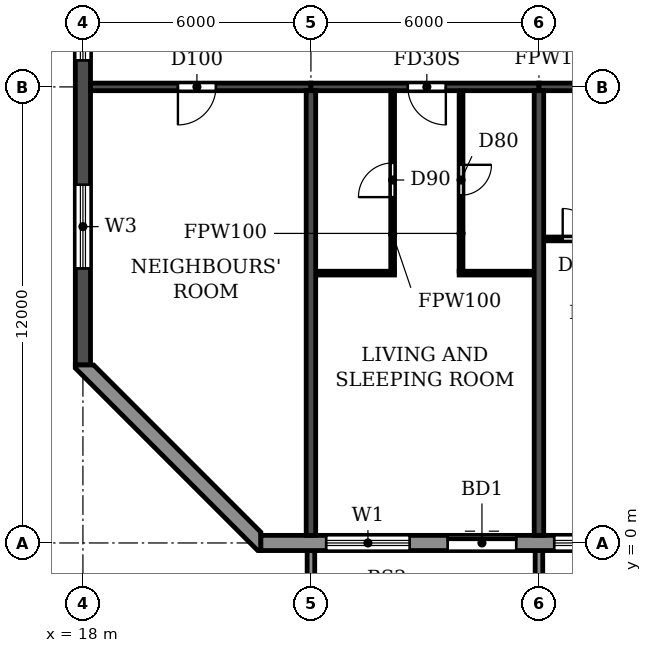
"""IFC4 building model, lengths in metres.
Left out: names, types, materials, properties, quantities, classifications, styles, units other than length and angle.
Written with IfcOpenShell. Run it as: python <this file> out.ifc"""

import sys

from ifc_helpers import new_model, si_unit, direction, frame, frame_2d, origin, place, context, subcontext, project, spatial, polyline, rectangle, outline, extrude, source, transform, mapped, element, fill, save


model = new_model("IFC4")
c1 = context("Model", 3, precision=1e-05, world=origin(), true_north=direction((0.0, 1.0)))
c2 = subcontext(c1, "Body", "Model", "MODEL_VIEW")
j1 = project(units=[si_unit("LENGTHUNIT", "METRE"), si_unit("PLANEANGLEUNIT", "RADIAN")], contexts=[c1])
p1 = place(None, origin())
s1 = spatial("IfcSite", under=j1, at=p1, CompositionType="ELEMENT")
p2 = place(p1, origin())
s2 = spatial("IfcBuilding", under=s1, at=p2, CompositionType="ELEMENT")
p3 = place(p2, frame((0.0, 0.0, 171.9)))
s3 = spatial("IfcBuildingStorey", under=s2, at=p3, CompositionType="ELEMENT", Elevation=171.9)
for number, where, z_axis, x_axis in (
    (1, (24.0, 0.2, 0.0), (0.0, 0.0, 1.0), (0.0, 1.0, 0.0)),
    (2, (30.0, 0.2, 0.0), (0.0, 0.0, 1.0), (0.0, 1.0, 0.0)),
):
    element("IfcWall", number, at=place(p3, frame(where, z_axis=z_axis, x_axis=x_axis)), inside=s3, PredefinedType="SHEAR", context=c2, shape_type="SweptSolid", body=[
        extrude(rectangle(XDim=11.7, YDim=0.25, at=frame_2d((5.85, 0.0))), origin(), (0.0, 0.0, 1.0), 3.08),
    ])
p4 = place(p3, frame((18.0, 4.683, 0.0), z_axis=(0.0, 0.0, 1.0), x_axis=(0.0, 1.0, 0.0)))
e3 = element("IfcWall", 3, at=p4, inside=s3, PredefinedType="SHEAR", context=c2, shape_type="SweptSolid", body=[
    extrude(rectangle(XDim=31.834, YDim=0.4, at=frame_2d((15.917, 0.0))), origin(), (0.0, 0.0, 1.0), 3.08),
])
p5 = place(p4, frame((23.817, 0.0, 0.9)))
e4 = element("IfcOpeningElement", 4, at=p5, cuts=e3, PredefinedType="OPENING", context=c2, shape_type="SweptSolid", body=[
    extrude(rectangle(XDim=1.2, YDim=1.5, at=frame_2d((0.6, 0.75))), frame((0.0, 0.21, 0.0), z_axis=(0.0, -1.0, 0.0), x_axis=(1.0, 0.0, 0.0)), (0.0, 0.0, 1.0), 0.42),
])
p6 = place(p4, frame((8.017, 0.0, 0.9)))
e5 = element("IfcOpeningElement", 5, at=p6, cuts=e3, PredefinedType="OPENING", context=c2, shape_type="SweptSolid", body=[
    extrude(rectangle(XDim=1.2, YDim=1.5, at=frame_2d((0.6, 0.75))), frame((0.0, 0.21, 0.0), z_axis=(0.0, -1.0, 0.0), x_axis=(1.0, 0.0, 0.0)), (0.0, 0.0, 1.0), 0.42),
])
p7 = place(p4, frame((27.694, 0.0, 0.6)))
e6 = element("IfcOpeningElement", 6, at=p7, cuts=e3, PredefinedType="OPENING", context=c2, shape_type="SweptSolid", body=[
    extrude(rectangle(XDim=2.2, YDim=1.8, at=frame_2d((1.1, 0.9))), frame((0.0, 0.21, 0.0), z_axis=(0.0, -1.0, 0.0), x_axis=(1.0, 0.0, 0.0)), (0.0, 0.0, 1.0), 0.42),
])
p8 = place(p4, frame((2.541, 0.0, 0.6)))
e7 = element("IfcOpeningElement", 7, at=p8, cuts=e3, PredefinedType="OPENING", context=c2, shape_type="SweptSolid", body=[
    extrude(rectangle(XDim=2.2, YDim=1.8, at=frame_2d((1.1, 0.9))), frame((0.0, 0.21, 0.0), z_axis=(0.0, -1.0, 0.0), x_axis=(1.0, 0.0, 0.0)), (0.0, 0.0, 1.0), 0.42),
])
p9 = place(p4, frame((15.917, 0.0, 0.9)))
e8 = element("IfcOpeningElement", 8, at=p9, cuts=e3, PredefinedType="OPENING", context=c2, shape_type="SweptSolid", body=[
    extrude(rectangle(XDim=1.2, YDim=1.5, at=frame_2d((0.6, 0.75))), frame((0.0, 0.21, 0.0), z_axis=(0.0, -1.0, 0.0), x_axis=(1.0, 0.0, 0.0)), (0.0, 0.0, 1.0), 0.42),
])
p10 = place(p3, frame((18.2, 12.0, 0.0), z_axis=(0.0, 0.0, 1.0), x_axis=(1.0, 0.0, 0.0)))
e9 = element("IfcWall", 9, at=p10, inside=s3, PredefinedType="SHEAR", context=c2, shape_type="SweptSolid", body=[
    extrude(rectangle(XDim=5.8, YDim=0.2, at=frame_2d((2.9, 0.0))), origin(), (0.0, 0.0, 1.0), 2.48),
])
p11 = place(p10, frame((2.3, 0.0, 0.0)))
e10 = element("IfcOpeningElement", 10, at=p11, cuts=e9, PredefinedType="OPENING", context=c2, shape_type="SweptSolid", body=[
    extrude(rectangle(XDim=1.0, YDim=2.1, at=frame_2d((0.5, 1.05))), frame((0.0, 0.11, 0.0), z_axis=(0.0, -1.0, 0.0), x_axis=(1.0, 0.0, 0.0)), (0.0, 0.0, 1.0), 0.22),
])
p12 = place(p3, frame((24.0, 12.0, 0.0), z_axis=(0.0, 0.0, 1.0), x_axis=(1.0, 0.0, 0.0)))
e11 = element("IfcWall", 11, at=p12, inside=s3, PredefinedType="SHEAR", context=c2, shape_type="SweptSolid", body=[
    extrude(rectangle(XDim=6.0, YDim=0.2, at=frame_2d((3.0, 0.0))), origin(), (0.0, 0.0, 1.0), 2.48),
])
p13 = place(p12, frame((2.55, 0.0, 0.0)))
e12 = element("IfcOpeningElement", 12, at=p13, cuts=e11, PredefinedType="OPENING", context=c2, shape_type="SweptSolid", body=[
    extrude(rectangle(XDim=1.0, YDim=2.1, at=frame_2d((0.5, 1.05))), frame((0.0, 0.11, 0.0), z_axis=(0.0, -1.0, 0.0), x_axis=(1.0, 0.0, 0.0)), (0.0, 0.0, 1.0), 0.22),
])
p14 = place(p3, frame((30.0, 12.0, 0.0), z_axis=(0.0, 0.0, 1.0), x_axis=(1.0, 0.0, 0.0)))
e13 = element("IfcWall", 13, at=p14, inside=s3, PredefinedType="SHEAR", context=c2, shape_type="SweptSolid", body=[
    extrude(rectangle(XDim=6.0, YDim=0.2, at=frame_2d((3.0, 0.0))), origin(), (0.0, 0.0, 1.0), 2.48),
])
p15 = place(p14, frame((2.45, 0.0, 0.0)))
e14 = element("IfcOpeningElement", 14, at=p15, cuts=e13, PredefinedType="OPENING", context=c2, shape_type="SweptSolid", body=[
    extrude(rectangle(XDim=1.0, YDim=2.1, at=frame_2d((0.5, 1.05))), frame((0.0, 0.11, 0.0), z_axis=(0.0, -1.0, 0.0), x_axis=(1.0, 0.0, 0.0)), (0.0, 0.0, 1.0), 0.22),
])
p16 = place(p3, frame((22.683, 0.0, 0.0), z_axis=(0.0, 0.0, 1.0), x_axis=(1.0, 0.0, 0.0)))
e15 = element("IfcWall", 15, at=p16, inside=s3, PredefinedType="STANDARD", context=c2, shape_type="SweptSolid", body=[
    extrude(rectangle(XDim=56.634, YDim=0.4, at=frame_2d((28.317, 0.0))), origin(), (0.0, 0.0, 1.0), 3.08),
])
p17 = place(p16, frame((1.717, 0.0, 0.9)))
e16 = element("IfcOpeningElement", 16, at=p17, cuts=e15, PredefinedType="OPENING", context=c2, shape_type="SweptSolid", body=[
    extrude(rectangle(XDim=2.2, YDim=1.5, at=frame_2d((1.1, 0.75))), frame((0.0, 0.21, 0.0), z_axis=(0.0, -1.0, 0.0), x_axis=(1.0, 0.0, 0.0)), (0.0, 0.0, 1.0), 0.42),
])
p18 = place(p16, frame((4.917, 0.0, 0.0)))
e17 = element("IfcOpeningElement", 17, at=p18, cuts=e15, PredefinedType="OPENING", context=c2, shape_type="SweptSolid", body=[
    extrude(rectangle(XDim=1.8, YDim=2.4, at=frame_2d((0.9, 1.2))), frame((0.0, 0.21, 0.0), z_axis=(0.0, -1.0, 0.0), x_axis=(1.0, 0.0, 0.0)), (0.0, 0.0, 1.0), 0.42),
])
p19 = place(p16, frame((7.717, 0.0, 0.9)))
e18 = element("IfcOpeningElement", 18, at=p19, cuts=e15, PredefinedType="OPENING", context=c2, shape_type="SweptSolid", body=[
    extrude(rectangle(XDim=2.2, YDim=1.5, at=frame_2d((1.1, 0.75))), frame((0.0, 0.21, 0.0), z_axis=(0.0, -1.0, 0.0), x_axis=(1.0, 0.0, 0.0)), (0.0, 0.0, 1.0), 0.42),
])
p20 = place(p16, frame((10.717, 0.0, 0.9)))
e19 = element("IfcOpeningElement", 19, at=p20, cuts=e15, PredefinedType="OPENING", context=c2, shape_type="SweptSolid", body=[
    extrude(rectangle(XDim=2.2, YDim=1.5, at=frame_2d((1.1, 0.75))), frame((0.0, 0.21, 0.0), z_axis=(0.0, -1.0, 0.0), x_axis=(1.0, 0.0, 0.0)), (0.0, 0.0, 1.0), 0.42),
])
p21 = place(p16, frame((13.717, 0.0, 0.9)))
e20 = element("IfcOpeningElement", 20, at=p21, cuts=e15, PredefinedType="OPENING", context=c2, shape_type="SweptSolid", body=[
    extrude(rectangle(XDim=2.2, YDim=1.5, at=frame_2d((1.1, 0.75))), frame((0.0, 0.21, 0.0), z_axis=(0.0, -1.0, 0.0), x_axis=(1.0, 0.0, 0.0)), (0.0, 0.0, 1.0), 0.42),
])
p22 = place(p16, frame((16.917, 0.0, 0.0)))
e21 = element("IfcOpeningElement", 21, at=p22, cuts=e15, PredefinedType="OPENING", context=c2, shape_type="SweptSolid", body=[
    extrude(rectangle(XDim=1.8, YDim=2.4, at=frame_2d((0.9, 1.2))), frame((0.0, 0.21, 0.0), z_axis=(0.0, -1.0, 0.0), x_axis=(1.0, 0.0, 0.0)), (0.0, 0.0, 1.0), 0.42),
])
p23 = place(p16, frame((19.717, 0.0, 0.9)))
e22 = element("IfcOpeningElement", 22, at=p23, cuts=e15, PredefinedType="OPENING", context=c2, shape_type="SweptSolid", body=[
    extrude(rectangle(XDim=2.2, YDim=1.5, at=frame_2d((1.1, 0.75))), frame((0.0, 0.21, 0.0), z_axis=(0.0, -1.0, 0.0), x_axis=(1.0, 0.0, 0.0)), (0.0, 0.0, 1.0), 0.42),
])
p24 = place(p16, frame((22.717, 0.0, 0.9)))
e23 = element("IfcOpeningElement", 23, at=p24, cuts=e15, PredefinedType="OPENING", context=c2, shape_type="SweptSolid", body=[
    extrude(rectangle(XDim=2.2, YDim=1.5, at=frame_2d((1.1, 0.75))), frame((0.0, 0.21, 0.0), z_axis=(0.0, -1.0, 0.0), x_axis=(1.0, 0.0, 0.0)), (0.0, 0.0, 1.0), 0.42),
])
p25 = place(p16, frame((25.917, 0.0, 0.0)))
e24 = element("IfcOpeningElement", 24, at=p25, cuts=e15, PredefinedType="OPENING", context=c2, shape_type="SweptSolid", body=[
    extrude(rectangle(XDim=1.8, YDim=2.4, at=frame_2d((0.9, 1.2))), frame((0.0, 0.21, 0.0), z_axis=(0.0, -1.0, 0.0), x_axis=(1.0, 0.0, 0.0)), (0.0, 0.0, 1.0), 0.42),
])
p26 = place(p16, frame((28.717, 0.0, 0.9)))
e25 = element("IfcOpeningElement", 25, at=p26, cuts=e15, PredefinedType="OPENING", context=c2, shape_type="SweptSolid", body=[
    extrude(rectangle(XDim=2.2, YDim=1.5, at=frame_2d((1.1, 0.75))), frame((0.0, 0.21, 0.0), z_axis=(0.0, -1.0, 0.0), x_axis=(1.0, 0.0, 0.0)), (0.0, 0.0, 1.0), 0.42),
])
p27 = place(p16, frame((31.717, 0.0, 0.9)))
e26 = element("IfcOpeningElement", 26, at=p27, cuts=e15, PredefinedType="OPENING", context=c2, shape_type="SweptSolid", body=[
    extrude(rectangle(XDim=2.2, YDim=1.5, at=frame_2d((1.1, 0.75))), frame((0.0, 0.21, 0.0), z_axis=(0.0, -1.0, 0.0), x_axis=(1.0, 0.0, 0.0)), (0.0, 0.0, 1.0), 0.42),
])
p28 = place(p16, frame((34.717, 0.0, 0.9)))
e27 = element("IfcOpeningElement", 27, at=p28, cuts=e15, PredefinedType="OPENING", context=c2, shape_type="SweptSolid", body=[
    extrude(rectangle(XDim=2.2, YDim=1.5, at=frame_2d((1.1, 0.75))), frame((0.0, 0.21, 0.0), z_axis=(0.0, -1.0, 0.0), x_axis=(1.0, 0.0, 0.0)), (0.0, 0.0, 1.0), 0.42),
])
p29 = place(p16, frame((37.717, 0.0, 0.9)))
e28 = element("IfcOpeningElement", 28, at=p29, cuts=e15, PredefinedType="OPENING", context=c2, shape_type="SweptSolid", body=[
    extrude(rectangle(XDim=2.2, YDim=1.5, at=frame_2d((1.1, 0.75))), frame((0.0, 0.21, 0.0), z_axis=(0.0, -1.0, 0.0), x_axis=(1.0, 0.0, 0.0)), (0.0, 0.0, 1.0), 0.42),
])
p30 = place(p16, frame((40.917, 0.0, 0.0)))
e29 = element("IfcOpeningElement", 29, at=p30, cuts=e15, PredefinedType="OPENING", context=c2, shape_type="SweptSolid", body=[
    extrude(rectangle(XDim=1.8, YDim=2.4, at=frame_2d((0.9, 1.2))), frame((0.0, 0.21, 0.0), z_axis=(0.0, -1.0, 0.0), x_axis=(1.0, 0.0, 0.0)), (0.0, 0.0, 1.0), 0.42),
])
p31 = place(p16, frame((43.717, 0.0, 0.9)))
e30 = element("IfcOpeningElement", 30, at=p31, cuts=e15, PredefinedType="OPENING", context=c2, shape_type="SweptSolid", body=[
    extrude(rectangle(XDim=2.2, YDim=1.5, at=frame_2d((1.1, 0.75))), frame((0.0, 0.21, 0.0), z_axis=(0.0, -1.0, 0.0), x_axis=(1.0, 0.0, 0.0)), (0.0, 0.0, 1.0), 0.42),
])
p32 = place(p16, frame((46.717, 0.0, 0.9)))
e31 = element("IfcOpeningElement", 31, at=p32, cuts=e15, PredefinedType="OPENING", context=c2, shape_type="SweptSolid", body=[
    extrude(rectangle(XDim=2.2, YDim=1.5, at=frame_2d((1.1, 0.75))), frame((0.0, 0.21, 0.0), z_axis=(0.0, -1.0, 0.0), x_axis=(1.0, 0.0, 0.0)), (0.0, 0.0, 1.0), 0.42),
])
p33 = place(p16, frame((49.717, 0.0, 0.9)))
e32 = element("IfcOpeningElement", 32, at=p33, cuts=e15, PredefinedType="OPENING", context=c2, shape_type="SweptSolid", body=[
    extrude(rectangle(XDim=2.2, YDim=1.5, at=frame_2d((1.1, 0.75))), frame((0.0, 0.21, 0.0), z_axis=(0.0, -1.0, 0.0), x_axis=(1.0, 0.0, 0.0)), (0.0, 0.0, 1.0), 0.42),
])
p34 = place(p16, frame((52.917, 0.0, 0.0)))
e33 = element("IfcOpeningElement", 33, at=p34, cuts=e15, PredefinedType="OPENING", context=c2, shape_type="SweptSolid", body=[
    extrude(rectangle(XDim=1.8, YDim=2.4, at=frame_2d((0.9, 1.2))), frame((0.0, 0.21, 0.0), z_axis=(0.0, -1.0, 0.0), x_axis=(1.0, 0.0, 0.0)), (0.0, 0.0, 1.0), 0.42),
])
p35 = place(p3, origin())
e34 = element("IfcWall", 34, at=p35, inside=s3, PredefinedType="STANDARD", context=c2, shape_type="SweptSolid", body=[
    extrude(outline(polyline([(17.8, 4.683), (17.8, 4.6), (22.6, -0.2), (22.683, -0.2), (22.683, 0.283), (18.283, 4.683), (17.8, 4.683)])), origin(), (0.0, 0.0, 1.0), 3.08),
])
m1 = source(origin(), c2, "Body", "SweptSolid", [
    extrude(outline(polyline([(0.0, 0.0), (0.2, 0.0), (0.2, 1.65), (0.0, 1.65), (0.0, 0.0)])), origin(), (0.0, 0.0, 1.0), 3.1),
])
for number, where in (
    (35, (23.9, -1.85, 0.0)),
    (36, (29.9, -1.85, 0.0)),
):
    element("IfcWall", number, at=place(p3, frame(where)), inside=s3, PredefinedType="STANDARD", context=c2, shape_type="MappedRepresentation", body=[
        mapped(m1, transform((0.0, 0.0, 0.0))),
    ])
p36 = place(p3, frame((24.135, 7.1, 0.0), z_axis=(0.0, 0.0, 1.0), x_axis=(1.0, 0.0, 0.0)))
e37 = element("IfcWall", 37, at=p36, inside=s3, PredefinedType="PARTITIONING", context=c2, shape_type="SweptSolid", body=[
    extrude(rectangle(XDim=2.065, YDim=0.1, at=frame_2d((1.032, 0.0))), origin(), (0.0, 0.0, 1.0), 3.08),
])
p37 = place(p3, frame((27.9, 7.1, 0.0), z_axis=(0.0, 0.0, 1.0), x_axis=(1.0, 0.0, 0.0)))
e38 = element("IfcWall", 38, at=p37, inside=s3, PredefinedType="PARTITIONING", context=c2, shape_type="SweptSolid", body=[
    extrude(rectangle(XDim=1.965, YDim=0.1, at=frame_2d((0.982, 0.0))), origin(), (0.0, 0.0, 1.0), 3.08),
])
p38 = place(p3, frame((30.135, 8.0, 0.0), z_axis=(0.0, 0.0, 1.0), x_axis=(1.0, 0.0, 0.0)))
e39 = element("IfcWall", 39, at=p38, inside=s3, PredefinedType="PARTITIONING", context=c2, shape_type="SweptSolid", body=[
    extrude(rectangle(XDim=1.965, YDim=0.1, at=frame_2d((0.982, 0.0))), origin(), (0.0, 0.0, 1.0), 3.08),
])
p39 = place(p38, frame((0.49, 0.0, 0.0)))
e40 = element("IfcOpeningElement", 40, at=p39, cuts=e39, PredefinedType="OPENING", context=c2, shape_type="SweptSolid", body=[
    extrude(rectangle(XDim=0.8, YDim=2.1, at=frame_2d((0.4, 1.05))), frame((0.0, 0.06, 0.0), z_axis=(0.0, -1.0, 0.0), x_axis=(1.0, 0.0, 0.0)), (0.0, 0.0, 1.0), 0.12),
])
p40 = place(p3, frame((26.15, 7.15, 0.0), z_axis=(0.0, 0.0, 1.0), x_axis=(0.0, 1.0, 0.0)))
e41 = element("IfcWall", 41, at=p40, inside=s3, PredefinedType="PARTITIONING", context=c2, shape_type="SweptSolid", body=[
    extrude(rectangle(XDim=4.74, YDim=0.1, at=frame_2d((2.37, 0.0))), origin(), (0.0, 0.0, 1.0), 3.08),
])
p41 = place(p40, frame((1.95, 0.0, 0.0)))
e42 = element("IfcOpeningElement", 42, at=p41, cuts=e41, PredefinedType="OPENING", context=c2, shape_type="SweptSolid", body=[
    extrude(rectangle(XDim=0.9, YDim=2.1, at=frame_2d((0.45, 1.05))), frame((0.0, 0.06, 0.0), z_axis=(0.0, -1.0, 0.0), x_axis=(1.0, 0.0, 0.0)), (0.0, 0.0, 1.0), 0.12),
])
p42 = place(p3, frame((27.95, 7.15, 0.0), z_axis=(0.0, 0.0, 1.0), x_axis=(0.0, 1.0, 0.0)))
e43 = element("IfcWall", 43, at=p42, inside=s3, PredefinedType="PARTITIONING", context=c2, shape_type="SweptSolid", body=[
    extrude(rectangle(XDim=4.74, YDim=0.1, at=frame_2d((2.37, 0.0))), origin(), (0.0, 0.0, 1.0), 3.08),
])
p43 = place(p42, frame((2.0, 0.0, 0.0)))
e44 = element("IfcOpeningElement", 44, at=p43, cuts=e43, PredefinedType="OPENING", context=c2, shape_type="SweptSolid", body=[
    extrude(rectangle(XDim=0.8, YDim=2.1, at=frame_2d((0.4, 1.05))), frame((0.0, 0.06, 0.0), z_axis=(0.0, -1.0, 0.0), x_axis=(1.0, 0.0, 0.0)), (0.0, 0.0, 1.0), 0.12),
])
p44 = place(p17, origin())
e45 = element("IfcWindow", 45, at=p44, inside=s3, PartitioningType="DOUBLE_PANEL_HORIZONTAL", PredefinedType="WINDOW", context=c2, shape_type="SweptSolid", body=[
    extrude(rectangle(XDim=2.2, YDim=1.5, at=frame_2d((1.1, 0.75))), frame((0.0, 0.03, 0.0), z_axis=(0.0, -1.0, 0.0), x_axis=(1.0, 0.0, 0.0)), (0.0, 0.0, 1.0), 0.06),
])
fill(e16, e45)
p45 = place(p18, origin())
e46 = element("IfcDoor", 46, at=p45, inside=s3, OperationType="DOUBLE_DOOR_SLIDING", PredefinedType="DOOR", context=c2, shape_type="SweptSolid", body=[
    extrude(rectangle(XDim=1.8, YDim=2.4, at=frame_2d((0.9, 1.2))), frame((0.0, 0.025, 0.0), z_axis=(0.0, -1.0, 0.0), x_axis=(1.0, 0.0, 0.0)), (0.0, 0.0, 1.0), 0.05),
])
fill(e17, e46)
p46 = place(p19, origin())
e47 = element("IfcWindow", 47, at=p46, inside=s3, PartitioningType="DOUBLE_PANEL_HORIZONTAL", PredefinedType="WINDOW", context=c2, shape_type="SweptSolid", body=[
    extrude(rectangle(XDim=2.2, YDim=1.5, at=frame_2d((1.1, 0.75))), frame((0.0, 0.03, 0.0), z_axis=(0.0, -1.0, 0.0), x_axis=(1.0, 0.0, 0.0)), (0.0, 0.0, 1.0), 0.06),
])
fill(e18, e47)
p47 = place(p6, origin())
e48 = element("IfcWindow", 48, at=p47, inside=s3, PartitioningType="SINGLE_PANEL", PredefinedType="WINDOW", context=c2, shape_type="SweptSolid", body=[
    extrude(rectangle(XDim=1.2, YDim=1.5, at=frame_2d((0.6, 0.75))), frame((0.0, 0.03, 0.0), z_axis=(0.0, -1.0, 0.0), x_axis=(1.0, 0.0, 0.0)), (0.0, 0.0, 1.0), 0.06),
])
fill(e5, e48)
p48 = place(p8, origin())
e49 = element("IfcWindow", 49, at=p48, inside=s3, PartitioningType="DOUBLE_PANEL_HORIZONTAL", PredefinedType="WINDOW", context=c2, shape_type="SweptSolid", body=[
    extrude(rectangle(XDim=2.2, YDim=1.8, at=frame_2d((1.1, 0.9))), frame((0.0, 0.03, 0.0), z_axis=(0.0, -1.0, 0.0), x_axis=(1.0, 0.0, 0.0)), (0.0, 0.0, 1.0), 0.06),
])
fill(e7, e49)
p49 = place(p11, frame((1.0, 0.0, 0.0), z_axis=(0.0, 0.0, 1.0), x_axis=(-1.0, 0.0, 0.0)))
e50 = element("IfcDoor", 50, at=p49, inside=s3, OperationType="SINGLE_SWING_RIGHT", PredefinedType="DOOR", context=c2, shape_type="SweptSolid", body=[
    extrude(rectangle(XDim=1.0, YDim=2.1, at=frame_2d((0.5, 1.05))), frame((0.0, 0.025, 0.0), z_axis=(0.0, -1.0, 0.0), x_axis=(1.0, 0.0, 0.0)), (0.0, 0.0, 1.0), 0.05),
])
fill(e10, e50)
p50 = place(p41, origin())
e51 = element("IfcDoor", 51, at=p50, inside=s3, OperationType="SINGLE_SWING_LEFT", PredefinedType="DOOR", context=c2, shape_type="SweptSolid", body=[
    extrude(rectangle(XDim=0.9, YDim=2.1, at=frame_2d((0.45, 1.05))), frame((0.0, 0.025, 0.0), z_axis=(0.0, -1.0, 0.0), x_axis=(1.0, 0.0, 0.0)), (0.0, 0.0, 1.0), 0.05),
])
fill(e42, e51)
p51 = place(p13, frame((1.0, 0.0, 0.0), z_axis=(0.0, 0.0, 1.0), x_axis=(-1.0, 0.0, 0.0)))
e52 = element("IfcDoor", 52, at=p51, inside=s3, OperationType="SINGLE_SWING_LEFT", PredefinedType="DOOR", context=c2, shape_type="SweptSolid", body=[
    extrude(rectangle(XDim=1.0, YDim=2.1, at=frame_2d((0.5, 1.05))), frame((0.0, 0.025, 0.0), z_axis=(0.0, -1.0, 0.0), x_axis=(1.0, 0.0, 0.0)), (0.0, 0.0, 1.0), 0.05),
])
fill(e12, e52)
p52 = place(p43, frame((0.8, 0.0, 0.0), z_axis=(0.0, 0.0, 1.0), x_axis=(-1.0, 0.0, 0.0)))
e53 = element("IfcDoor", 53, at=p52, inside=s3, OperationType="SINGLE_SWING_LEFT", PredefinedType="DOOR", context=c2, shape_type="SweptSolid", body=[
    extrude(rectangle(XDim=0.8, YDim=2.1, at=frame_2d((0.4, 1.05))), frame((0.0, 0.025, 0.0), z_axis=(0.0, -1.0, 0.0), x_axis=(1.0, 0.0, 0.0)), (0.0, 0.0, 1.0), 0.05),
])
fill(e44, e53)
p53 = place(p39, origin())
e54 = element("IfcDoor", 54, at=p53, inside=s3, OperationType="SINGLE_SWING_LEFT", PredefinedType="DOOR", context=c2, shape_type="SweptSolid", body=[
    extrude(rectangle(XDim=0.8, YDim=2.1, at=frame_2d((0.4, 1.05))), frame((0.0, 0.025, 0.0), z_axis=(0.0, -1.0, 0.0), x_axis=(1.0, 0.0, 0.0)), (0.0, 0.0, 1.0), 0.05),
])
fill(e40, e54)
save(model, sys.argv[1])
